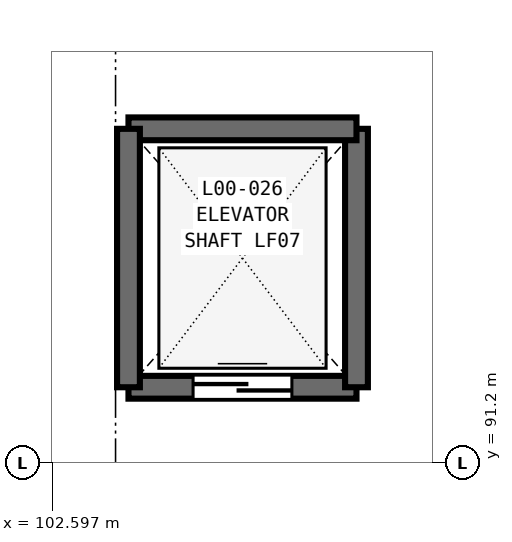
"""IFC4 building model, lengths in metres.
Left out: names, types, materials, properties, quantities, classifications, styles, units other than length and angle.
Written with IfcOpenShell. Run it as: python <this file> out.ifc"""

import sys

from ifc_helpers import new_model, si_unit, direction, frame, frame_2d, origin, place, context, subcontext, project, spatial, rectangle, extrude, element, fill, save


model = new_model("IFC4")
c1 = context("Model", 3, precision=1e-05, world=origin(), true_north=direction((0.0, 1.0)))
c2 = subcontext(c1, "Body", "Model", "MODEL_VIEW")
j1 = project(units=[si_unit("LENGTHUNIT", "METRE"), si_unit("PLANEANGLEUNIT", "RADIAN")], contexts=[c1])
p1 = place(None, origin())
s1 = spatial("IfcSite", under=j1, at=p1, CompositionType="ELEMENT")
p2 = place(p1, origin())
s2 = spatial("IfcBuilding", under=s1, at=p2, CompositionType="ELEMENT")
p3 = place(p2, origin())
s3 = spatial("IfcBuildingStorey", under=s2, at=p3, CompositionType="ELEMENT", Elevation=0.0)
p4 = place(p3, frame((103.6, 92.2, 0.0), z_axis=(0.0, 0.0, 1.0), x_axis=(1.0, 0.0, 0.0)))
e1 = element("IfcWall", 1, at=p4, inside=s3, PredefinedType="SHEAR", context=c2, shape_type="SweptSolid", body=[
    extrude(rectangle(XDim=3.0, YDim=0.3, at=frame_2d((1.5, 0.0))), origin(), (0.0, 0.0, 1.0), 5.4),
])
p5 = place(p4, frame((0.85, 0.0, 0.0)))
e2 = element("IfcOpeningElement", 2, at=p5, cuts=e1, PredefinedType="OPENING", context=c2, shape_type="SweptSolid", body=[
    extrude(rectangle(XDim=1.3, YDim=2.2, at=frame_2d((0.65, 1.1))), frame((0.0, 0.16, 0.0), z_axis=(0.0, -1.0, 0.0), x_axis=(1.0, 0.0, 0.0)), (0.0, 0.0, 1.0), 0.32),
])
p6 = place(p3, frame((106.6, 92.2, 0.0), z_axis=(0.0, 0.0, 1.0), x_axis=(0.0, 1.0, 0.0)))
e3 = element("IfcWall", 3, at=p6, inside=s3, PredefinedType="SHEAR", context=c2, shape_type="SweptSolid", body=[
    extrude(rectangle(XDim=3.4, YDim=0.3, at=frame_2d((1.7, 0.0))), origin(), (0.0, 0.0, 1.0), 5.4),
])
p7 = place(p3, frame((106.6, 95.6, 0.0), z_axis=(0.0, 0.0, 1.0), x_axis=(-1.0, 0.0, 0.0)))
e4 = element("IfcWall", 4, at=p7, inside=s3, PredefinedType="SHEAR", context=c2, shape_type="SweptSolid", body=[
    extrude(rectangle(XDim=3.0, YDim=0.3, at=frame_2d((1.5, 0.0))), origin(), (0.0, 0.0, 1.0), 5.4),
])
p8 = place(p3, frame((103.6, 95.6, 0.0), z_axis=(0.0, 0.0, 1.0), x_axis=(0.0, -1.0, 0.0)))
e5 = element("IfcWall", 5, at=p8, inside=s3, PredefinedType="SHEAR", context=c2, shape_type="SweptSolid", body=[
    extrude(rectangle(XDim=3.4, YDim=0.3, at=frame_2d((1.7, 0.0))), origin(), (0.0, 0.0, 1.0), 5.4),
])
p9 = place(p5, origin())
e6 = element("IfcDoor", 6, at=p9, inside=s3, OperationType="DOUBLE_DOOR_SLIDING", PredefinedType="DOOR", context=c2, shape_type="SweptSolid", body=[
    extrude(rectangle(XDim=1.3, YDim=2.2, at=frame_2d((0.65, 1.1))), frame((0.0, 0.025, 0.0), z_axis=(0.0, -1.0, 0.0), x_axis=(1.0, 0.0, 0.0)), (0.0, 0.0, 1.0), 0.05),
])
fill(e2, e6)
save(model, sys.argv[1])
